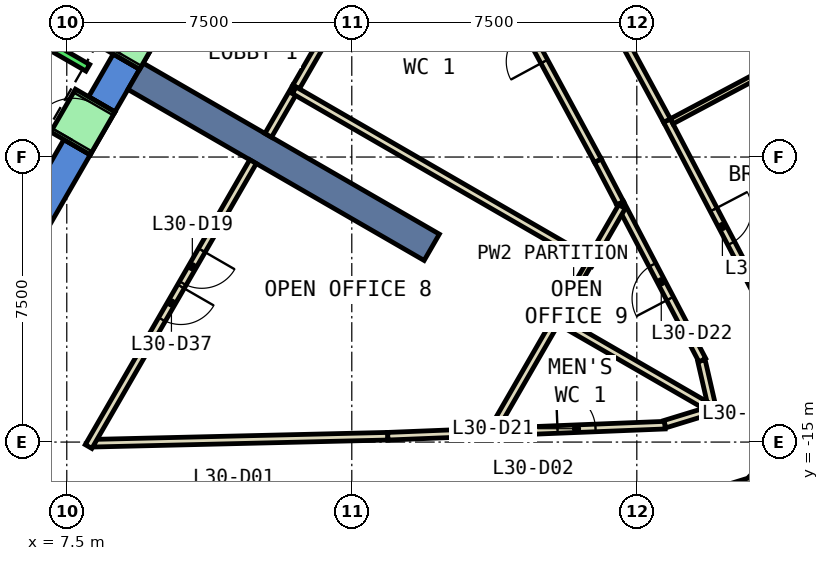
"""IFC4 building model, lengths in metres.
Left out: names, types, materials, properties, quantities, classifications, styles, units other than length and angle.
Written with IfcOpenShell. Run it as: python <this file> out.ifc"""

import sys

from ifc_helpers import new_model, si_unit, direction, frame, frame_2d, origin, place, context, subcontext, project, spatial, polyline, rectangle, outline, extrude, element, fill, save


model = new_model("IFC4")
c1 = context("Model", 3, precision=1e-05, world=origin(), true_north=direction((0.0, 1.0)))
c2 = subcontext(c1, "Body", "Model", "MODEL_VIEW")
j1 = project(units=[si_unit("LENGTHUNIT", "METRE"), si_unit("PLANEANGLEUNIT", "RADIAN")], contexts=[c1])
p1 = place(None, origin())
s1 = spatial("IfcSite", under=j1, at=p1, CompositionType="ELEMENT")
p2 = place(p1, origin())
s2 = spatial("IfcBuilding", under=s1, at=p2, CompositionType="ELEMENT")
p3 = place(p2, frame((0.0, 0.0, 138.2)))
s3 = spatial("IfcBuildingStorey", under=s2, at=p3, CompositionType="ELEMENT", Elevation=138.2)
p4 = place(p3, frame((0.0, 0.0, -0.6)))
e1 = element("IfcWall", 1, at=p4, inside=s3, PredefinedType="SHEAR", context=c2, shape_type="SweptSolid", body=[
    extrude(outline(polyline([(8.117, -7.44), (7.424, -7.04), (6.466, -8.7), (6.928, -9.5), (8.117, -7.44)])), origin(), (0.0, 0.0, 1.0), 4.4),
])
p5 = place(p3, frame((0.0, 0.0, -0.6)))
e2 = element("IfcWall", 2, at=p5, inside=s3, PredefinedType="SHEAR", context=c2, shape_type="SweptSolid", body=[
    extrude(outline(polyline([(9.417, -5.189), (8.724, -4.789), (8.075, -5.914), (8.767, -6.314), (9.417, -5.189)])), origin(), (0.0, 0.0, 1.0), 4.4),
])
p6 = place(p3, frame((0.0, 0.0, 3.6)))
e3 = element("IfcWall", 3, at=p6, inside=s3, PredefinedType="SHEAR", context=c2, shape_type="SweptSolid", body=[
    extrude(outline(polyline([(8.767, -6.314), (8.075, -5.914), (7.424, -7.04), (8.117, -7.44), (8.767, -6.314)])), origin(), (0.0, 0.0, 1.0), 0.2),
])
p7 = place(p3, frame((0.0, 0.0, 3.6)))
e4 = element("IfcWall", 4, at=p7, inside=s3, PredefinedType="SHEAR", context=c2, shape_type="SweptSolid", body=[
    extrude(outline(polyline([(10.067, -4.063), (9.374, -3.663), (8.724, -4.789), (9.417, -5.189), (10.067, -4.063)])), origin(), (0.0, 0.0, 1.0), 0.2),
])
p8 = place(p3, frame((9.31, -5.375, -0.6), z_axis=(0.0, 0.0, 1.0), x_axis=(0.866017533419, -0.500013631625, 0.0)))
e5 = element("IfcWall", 5, at=p8, inside=s3, PredefinedType="SHEAR", context=c2, shape_type="SweptSolid", body=[
    extrude(rectangle(XDim=9.0, YDim=0.8, at=frame_2d((4.5, 0.0))), origin(), (0.0, 0.0, 1.0), 4.4),
])
p9 = place(p3, frame((8.223, -15.029, 0.0), z_axis=(0.0, 0.0, 1.0), x_axis=(0.99971920994, 0.023696018186, 0.0)))
e6 = element("IfcWall", 6, at=p9, inside=s3, PredefinedType="PARTITIONING", context=c2, shape_type="SweptSolid", body=[
    extrude(rectangle(XDim=7.727, YDim=0.2, at=frame_2d((3.864, 0.0))), origin(), (0.0, 0.0, 1.0), 3.8),
])
p10 = place(p3, frame((15.948, -14.846, 0.0), z_axis=(0.0, 0.0, 1.0), x_axis=(0.999208477774, 0.039779617206, 0.0)))
e7 = element("IfcWall", 7, at=p10, inside=s3, PredefinedType="PARTITIONING", context=c2, shape_type="SweptSolid", body=[
    extrude(rectangle(XDim=2.639, YDim=0.2, at=frame_2d((1.32, 0.0))), origin(), (0.0, 0.0, 1.0), 3.8),
])
p11 = place(p3, frame((22.063, -8.717, 0.0), z_axis=(0.0, 0.0, 1.0), x_axis=(-0.463776683525, 0.885952136302, 0.0)))
e8 = element("IfcWall", 8, at=p11, inside=s3, PredefinedType="PARTITIONING", context=c2, shape_type="SweptSolid", body=[
    extrude(rectangle(XDim=1.268, YDim=0.2, at=frame_2d((0.634, 0.0))), origin(), (0.0, 0.0, 1.0), 3.8),
])
p12 = place(p3, frame((21.475, -7.594, 0.0), z_axis=(0.0, 0.0, 1.0), x_axis=(-0.475918691018, 0.879489283357, 0.0)))
e9 = element("IfcWall", 9, at=p12, inside=s3, PredefinedType="PARTITIONING", context=c2, shape_type="SweptSolid", body=[
    extrude(rectangle(XDim=6.928, YDim=0.2, at=frame_2d((3.464, 0.0))), origin(), (0.0, 0.0, 1.0), 3.8),
])
p13 = place(p12, frame((2.964, 0.0, 0.0)))
e10 = element("IfcOpeningElement", 10, at=p13, cuts=e9, PredefinedType="OPENING", context=c2, shape_type="SweptSolid", body=[
    extrude(rectangle(XDim=1.0, YDim=2.1, at=frame_2d((0.5, 1.05))), frame((0.0, 0.11, 0.0), z_axis=(0.0, -1.0, 0.0), x_axis=(1.0, 0.0, 0.0)), (0.0, 0.0, 1.0), 0.22),
])
p14 = place(p3, frame((18.585, -14.741, 0.0), z_axis=(0.0, 0.0, 1.0), x_axis=(0.99920304932, 0.039915739113, 0.0)))
e11 = element("IfcWall", 11, at=p14, inside=s3, PredefinedType="PARTITIONING", context=c2, shape_type="SweptSolid", body=[
    extrude(rectangle(XDim=4.661, YDim=0.2, at=frame_2d((2.33, 0.0))), origin(), (0.0, 0.0, 1.0), 3.8),
])
p15 = place(p14, frame((1.83, 0.0, 0.0)))
e12 = element("IfcOpeningElement", 12, at=p15, cuts=e11, PredefinedType="OPENING", context=c2, shape_type="SweptSolid", body=[
    extrude(rectangle(XDim=1.0, YDim=2.1, at=frame_2d((0.5, 1.05))), frame((0.0, 0.11, 0.0), z_axis=(0.0, -1.0, 0.0), x_axis=(1.0, 0.0, 0.0)), (0.0, 0.0, 1.0), 0.22),
])
p16 = place(p3, frame((23.238, -14.529, 0.0), z_axis=(0.0, 0.0, 1.0), x_axis=(0.956086269468, 0.293085389152, 0.0)))
e13 = element("IfcWall", 13, at=p16, inside=s3, PredefinedType="PARTITIONING", context=c2, shape_type="SweptSolid", body=[
    extrude(rectangle(XDim=1.252, YDim=0.2, at=frame_2d((0.626, 0.0))), origin(), (0.0, 0.0, 1.0), 3.8),
])
p17 = place(p3, frame((24.482, -14.081, 0.0), z_axis=(0.0, 0.0, 1.0), x_axis=(-0.223967203961, 0.974596681479, 0.0)))
e14 = element("IfcWall", 14, at=p17, inside=s3, PredefinedType="PARTITIONING", context=c2, shape_type="SweptSolid", body=[
    extrude(rectangle(XDim=1.259, YDim=0.2, at=frame_2d((0.629, 0.0))), origin(), (0.0, 0.0, 1.0), 3.8),
])
p18 = place(p3, frame((24.224, -12.845, 0.0), z_axis=(0.0, 0.0, 1.0), x_axis=(-0.463819025987, 0.885929969655, 0.0)))
e15 = element("IfcWall", 15, at=p18, inside=s3, PredefinedType="PARTITIONING", context=c2, shape_type="SweptSolid", body=[
    extrude(rectangle(XDim=4.659, YDim=0.2, at=frame_2d((2.33, 0.0))), origin(), (0.0, 0.0, 1.0), 3.8),
])
p19 = place(p18, frame((1.83, 0.0, 0.0)))
e16 = element("IfcOpeningElement", 16, at=p19, cuts=e15, PredefinedType="OPENING", context=c2, shape_type="SweptSolid", body=[
    extrude(rectangle(XDim=1.0, YDim=2.1, at=frame_2d((0.5, 1.05))), frame((0.0, 0.11, 0.0), z_axis=(0.0, -1.0, 0.0), x_axis=(1.0, 0.0, 0.0)), (0.0, 0.0, 1.0), 0.22),
])
p20 = place(p3, frame((25.563, -16.012, 0.0), z_axis=(0.0, 0.0, 1.0), x_axis=(-0.955896815358, -0.293702704087, 0.0)))
e17 = element("IfcWall", 17, at=p20, inside=s3, PredefinedType="PARTITIONING", context=c2, shape_type="SweptSolid", body=[
    extrude(rectangle(XDim=2.06, YDim=0.2, at=frame_2d((1.03, 0.0))), origin(), (0.0, 0.0, 1.0), 3.8),
])
p21 = place(p3, frame((23.294, -6.541, 0.0), z_axis=(0.0, 0.0, 1.0), x_axis=(0.463802391881, -0.885938678062, 0.0)))
e18 = element("IfcWall", 18, at=p21, inside=s3, PredefinedType="PARTITIONING", context=c2, shape_type="SweptSolid", body=[
    extrude(rectangle(XDim=6.287, YDim=0.2, at=frame_2d((3.144, 0.0))), origin(), (0.0, 0.0, 1.0), 3.8),
])
p22 = place(p21, frame((2.644, 0.0, 0.0)))
e19 = element("IfcOpeningElement", 19, at=p22, cuts=e18, PredefinedType="OPENING", context=c2, shape_type="SweptSolid", body=[
    extrude(rectangle(XDim=1.0, YDim=2.1, at=frame_2d((0.5, 1.05))), frame((0.0, 0.11, 0.0), z_axis=(0.0, -1.0, 0.0), x_axis=(1.0, 0.0, 0.0)), (0.0, 0.0, 1.0), 0.22),
])
p23 = place(p3, frame((20.018, -0.489, 0.0), z_axis=(0.0, 0.0, 1.0), x_axis=(0.476025981828, -0.87943121654, 0.0)))
e20 = element("IfcWall", 20, at=p23, inside=s3, PredefinedType="PARTITIONING", context=c2, shape_type="SweptSolid", body=[
    extrude(rectangle(XDim=6.882, YDim=0.2, at=frame_2d((3.441, 0.0))), origin(), (0.0, 0.0, 1.0), 3.8),
])
p24 = place(p23, frame((3.016, 0.0, 0.0)))
e21 = element("IfcOpeningElement", 21, at=p24, cuts=e20, PredefinedType="OPENING", context=c2, shape_type="SweptSolid", body=[
    extrude(rectangle(XDim=1.0, YDim=2.1, at=frame_2d((0.5, 1.05))), frame((0.0, 0.11, 0.0), z_axis=(0.0, -1.0, 0.0), x_axis=(1.0, 0.0, 0.0)), (0.0, 0.0, 1.0), 0.22),
])
p25 = place(p3, frame((13.535, -5.657, 0.0), z_axis=(0.0, 0.0, 1.0), x_axis=(-0.499751238113, -0.866168978898, 0.0)))
e22 = element("IfcWall", 22, at=p25, inside=s3, PredefinedType="PARTITIONING", context=c2, shape_type="SweptSolid", body=[
    extrude(rectangle(XDim=1.469, YDim=0.2, at=frame_2d((0.734, 0.0))), origin(), (0.0, 0.0, 1.0), 3.8),
])
p26 = place(p3, frame((17.124, 0.56, 0.0), z_axis=(0.0, 0.0, 1.0), x_axis=(-0.49996876383, -0.866043437245, 0.0)))
e23 = element("IfcWall", 23, at=p26, inside=s3, PredefinedType="PARTITIONING", context=c2, shape_type="SweptSolid", body=[
    extrude(rectangle(XDim=7.179, YDim=0.2, at=frame_2d((3.589, 0.0))), origin(), (0.0, 0.0, 1.0), 3.8),
])
p27 = place(p3, frame((13.485, -5.744, 0.0), z_axis=(0.0, 0.0, 1.0), x_axis=(0.865950545648, -0.500129635687, 0.0)))
e24 = element("IfcWall", 24, at=p27, inside=s3, PredefinedType="PARTITIONING", context=c2, shape_type="SweptSolid", body=[
    extrude(rectangle(XDim=9.1, YDim=0.2, at=frame_2d((4.55, 0.0))), origin(), (0.0, 0.0, 1.0), 3.8),
])
p28 = place(p3, frame((20.347, -11.858, 0.0), z_axis=(0.0, 0.0, 1.0), x_axis=(-0.49990681678, -0.866079196458, 0.0)))
e25 = element("IfcWall", 25, at=p28, inside=s3, PredefinedType="PARTITIONING", context=c2, shape_type="SweptSolid", body=[
    extrude(rectangle(XDim=3.324, YDim=0.2, at=frame_2d((1.662, 0.0))), origin(), (0.0, 0.0, 1.0), 3.8),
])
p29 = place(p3, frame((21.228, -10.331, 0.0), z_axis=(0.0, 0.0, 1.0), x_axis=(-0.499920861661, -0.866071089505, 0.0)))
e26 = element("IfcWall", 26, at=p29, inside=s3, PredefinedType="PARTITIONING", context=c2, shape_type="SweptSolid", body=[
    extrude(rectangle(XDim=1.562, YDim=0.15, at=frame_2d((0.781, 0.0))), origin(), (0.0, 0.0, 1.0), 3.8),
])
p30 = place(p3, frame((22.109, -8.805, 0.0), z_axis=(0.0, 0.0, 1.0), x_axis=(-0.499920861661, -0.866071089505, 0.0)))
e27 = element("IfcWall", 27, at=p30, inside=s3, PredefinedType="PARTITIONING", context=c2, shape_type="SweptSolid", body=[
    extrude(rectangle(XDim=1.562, YDim=0.2, at=frame_2d((0.781, 0.0))), origin(), (0.0, 0.0, 1.0), 3.8),
])
p31 = place(p3, frame((20.31, -11.721, 0.0), z_axis=(0.0, 0.0, 1.0), x_axis=(0.86603399059, -0.499985126921, 0.0)))
e28 = element("IfcWall", 28, at=p31, inside=s3, PredefinedType="PARTITIONING", context=c2, shape_type="SweptSolid", body=[
    extrude(rectangle(XDim=4.854, YDim=0.2, at=frame_2d((2.427, 0.0))), origin(), (0.0, 0.0, 1.0), 3.8),
])
p32 = place(p3, frame((23.417, -6.56, 0.0), z_axis=(0.0, 0.0, 1.0), x_axis=(0.882784638588, 0.469777906967, 0.0)))
e29 = element("IfcWall", 29, at=p32, inside=s3, PredefinedType="PARTITIONING", context=c2, shape_type="SweptSolid", body=[
    extrude(rectangle(XDim=5.13, YDim=0.15, at=frame_2d((2.565, 0.0))), origin(), (0.0, 0.0, 1.0), 3.8),
])
p33 = place(p3, frame((12.401, -7.621, 0.0), z_axis=(0.0, 0.0, 1.0), x_axis=(-0.499964151829, -0.866046099747, 0.0)))
e30 = element("IfcWall", 30, at=p33, inside=s3, PredefinedType="PARTITIONING", context=c2, shape_type="SweptSolid", body=[
    extrude(rectangle(XDim=8.656, YDim=0.2, at=frame_2d((4.328, 0.0))), origin(), (0.0, 0.0, 1.0), 3.8),
])
p34 = place(p33, frame((2.694, 0.0, 0.0)))
e31 = element("IfcOpeningElement", 31, at=p34, cuts=e30, PredefinedType="OPENING", context=c2, shape_type="SweptSolid", body=[
    extrude(rectangle(XDim=1.0, YDim=2.1, at=frame_2d((0.5, 1.05))), frame((0.0, 0.11, 0.0), z_axis=(0.0, -1.0, 0.0), x_axis=(1.0, 0.0, 0.0)), (0.0, 0.0, 1.0), 0.22),
])
p35 = place(p33, frame((3.794, 0.0, 0.0)))
e32 = element("IfcOpeningElement", 32, at=p35, cuts=e30, PredefinedType="OPENING", context=c2, shape_type="SweptSolid", body=[
    extrude(rectangle(XDim=1.0, YDim=2.1, at=frame_2d((0.5, 1.05))), frame((0.0, 0.11, 0.0), z_axis=(0.0, -1.0, 0.0), x_axis=(1.0, 0.0, 0.0)), (0.0, 0.0, 1.0), 0.22),
])
p36 = place(p3, frame((4.451, -6.19, 0.0), z_axis=(0.0, 0.0, 1.0), x_axis=(0.50000090737, 0.866024879913, 0.0)))
e33 = element("IfcWall", 33, at=p36, inside=s3, PredefinedType="STANDARD", context=c2, shape_type="SweptSolid", body=[
    extrude(rectangle(XDim=10.6, YDim=0.2, at=frame_2d((5.3, 0.0))), origin(), (0.0, 0.0, 1.0), 3.8),
])
p37 = place(p3, frame((5.888, -3.902, 0.0), z_axis=(0.0, 0.0, 1.0), x_axis=(0.866022959057, -0.500004234368, 0.0)))
e34 = element("IfcWall", 34, at=p37, inside=s3, PredefinedType="STANDARD", context=c2, shape_type="SweptSolid", body=[
    extrude(rectangle(XDim=2.5, YDim=0.2, at=frame_2d((1.25, 0.0))), origin(), (0.0, 0.0, 1.0), 3.8),
])
p38 = place(p3, frame((7.598, -7.14, 0.0), z_axis=(0.0, 0.0, 1.0), x_axis=(0.500362116554, 0.865816234728, 0.0)))
e35 = element("IfcWall", 35, at=p38, inside=s3, PredefinedType="STANDARD", context=c2, shape_type="SweptSolid", body=[
    extrude(rectangle(XDim=1.299, YDim=1.2, at=frame_2d((0.65, 0.0))), origin(), (0.0, 0.0, 1.0), 2.4),
])
p39 = place(p38, frame((0.1, 0.0, 0.0)))
e36 = element("IfcOpeningElement", 36, at=p39, cuts=e35, PredefinedType="OPENING", context=c2, shape_type="SweptSolid", body=[
    extrude(rectangle(XDim=1.1, YDim=2.3, at=frame_2d((0.55, 1.15))), frame((0.0, 0.61, 0.0), z_axis=(0.0, -1.0, 0.0), x_axis=(1.0, 0.0, 0.0)), (0.0, 0.0, 1.0), 1.22),
])
p40 = place(p3, frame((8.898, -4.889, 0.0), z_axis=(0.0, 0.0, 1.0), x_axis=(0.500036693733, 0.866004217611, 0.0)))
e37 = element("IfcWall", 37, at=p40, inside=s3, PredefinedType="STANDARD", context=c2, shape_type="SweptSolid", body=[
    extrude(rectangle(XDim=1.3, YDim=1.2, at=frame_2d((0.65, 0.0))), origin(), (0.0, 0.0, 1.0), 2.4),
])
p41 = place(p40, frame((0.1, 0.0, 0.0)))
e38 = element("IfcOpeningElement", 38, at=p41, cuts=e37, PredefinedType="OPENING", context=c2, shape_type="SweptSolid", body=[
    extrude(rectangle(XDim=1.1, YDim=2.3, at=frame_2d((0.55, 1.15))), frame((0.0, 0.61, 0.0), z_axis=(0.0, -1.0, 0.0), x_axis=(1.0, 0.0, 0.0)), (0.0, 0.0, 1.0), 1.22),
])
p42 = place(p22, origin())
e39 = element("IfcDoor", 39, at=p42, inside=s3, OperationType="SINGLE_SWING_LEFT", PredefinedType="DOOR", context=c2, shape_type="SweptSolid", body=[
    extrude(rectangle(XDim=1.0, YDim=2.1, at=frame_2d((0.5, 1.05))), frame((0.0, 0.025, 0.0), z_axis=(0.0, -1.0, 0.0), x_axis=(1.0, 0.0, 0.0)), (0.0, 0.0, 1.0), 0.05),
])
fill(e19, e39)
p43 = place(p34, origin())
e40 = element("IfcDoor", 40, at=p43, inside=s3, OperationType="SINGLE_SWING_LEFT", PredefinedType="DOOR", context=c2, shape_type="SweptSolid", body=[
    extrude(rectangle(XDim=1.0, YDim=2.1, at=frame_2d((0.5, 1.05))), frame((0.0, 0.025, 0.0), z_axis=(0.0, -1.0, 0.0), x_axis=(1.0, 0.0, 0.0)), (0.0, 0.0, 1.0), 0.05),
])
fill(e31, e40)
p44 = place(p13, origin())
e41 = element("IfcDoor", 41, at=p44, inside=s3, OperationType="SINGLE_SWING_LEFT", PredefinedType="DOOR", context=c2, shape_type="SweptSolid", body=[
    extrude(rectangle(XDim=1.0, YDim=2.1, at=frame_2d((0.5, 1.05))), frame((0.0, 0.025, 0.0), z_axis=(0.0, -1.0, 0.0), x_axis=(1.0, 0.0, 0.0)), (0.0, 0.0, 1.0), 0.05),
])
fill(e10, e41)
p45 = place(p15, origin())
e42 = element("IfcDoor", 42, at=p45, inside=s3, OperationType="SINGLE_SWING_LEFT", PredefinedType="DOOR", context=c2, shape_type="SweptSolid", body=[
    extrude(rectangle(XDim=1.0, YDim=2.1, at=frame_2d((0.5, 1.05))), frame((0.0, 0.025, 0.0), z_axis=(0.0, -1.0, 0.0), x_axis=(1.0, 0.0, 0.0)), (0.0, 0.0, 1.0), 0.05),
])
fill(e12, e42)
p46 = place(p19, origin())
e43 = element("IfcDoor", 43, at=p46, inside=s3, OperationType="SINGLE_SWING_LEFT", PredefinedType="DOOR", context=c2, shape_type="SweptSolid", body=[
    extrude(rectangle(XDim=1.0, YDim=2.1, at=frame_2d((0.5, 1.05))), frame((0.0, 0.025, 0.0), z_axis=(0.0, -1.0, 0.0), x_axis=(1.0, 0.0, 0.0)), (0.0, 0.0, 1.0), 0.05),
])
fill(e16, e43)
p47 = place(p35, origin())
e44 = element("IfcDoor", 44, at=p47, inside=s3, OperationType="SINGLE_SWING_RIGHT", PredefinedType="DOOR", context=c2, shape_type="SweptSolid", body=[
    extrude(rectangle(XDim=1.0, YDim=2.1, at=frame_2d((0.5, 1.05))), frame((0.0, 0.025, 0.0), z_axis=(0.0, -1.0, 0.0), x_axis=(1.0, 0.0, 0.0)), (0.0, 0.0, 1.0), 0.05),
])
fill(e32, e44)
p48 = place(p39, origin())
e45 = element("IfcDoor", 45, at=p48, inside=s3, OperationType="SLIDING_TO_LEFT", PredefinedType="DOOR", context=c2, shape_type="SweptSolid", body=[
    extrude(rectangle(XDim=1.1, YDim=2.3, at=frame_2d((0.55, 1.15))), frame((0.0, 0.025, 0.0), z_axis=(0.0, -1.0, 0.0), x_axis=(1.0, 0.0, 0.0)), (0.0, 0.0, 1.0), 0.05),
])
fill(e36, e45)
p49 = place(p41, origin())
e46 = element("IfcDoor", 46, at=p49, inside=s3, OperationType="SLIDING_TO_LEFT", PredefinedType="DOOR", context=c2, shape_type="SweptSolid", body=[
    extrude(rectangle(XDim=1.1, YDim=2.3, at=frame_2d((0.55, 1.15))), frame((0.0, 0.025, 0.0), z_axis=(0.0, -1.0, 0.0), x_axis=(1.0, 0.0, 0.0)), (0.0, 0.0, 1.0), 0.05),
])
fill(e38, e46)
save(model, sys.argv[1])
